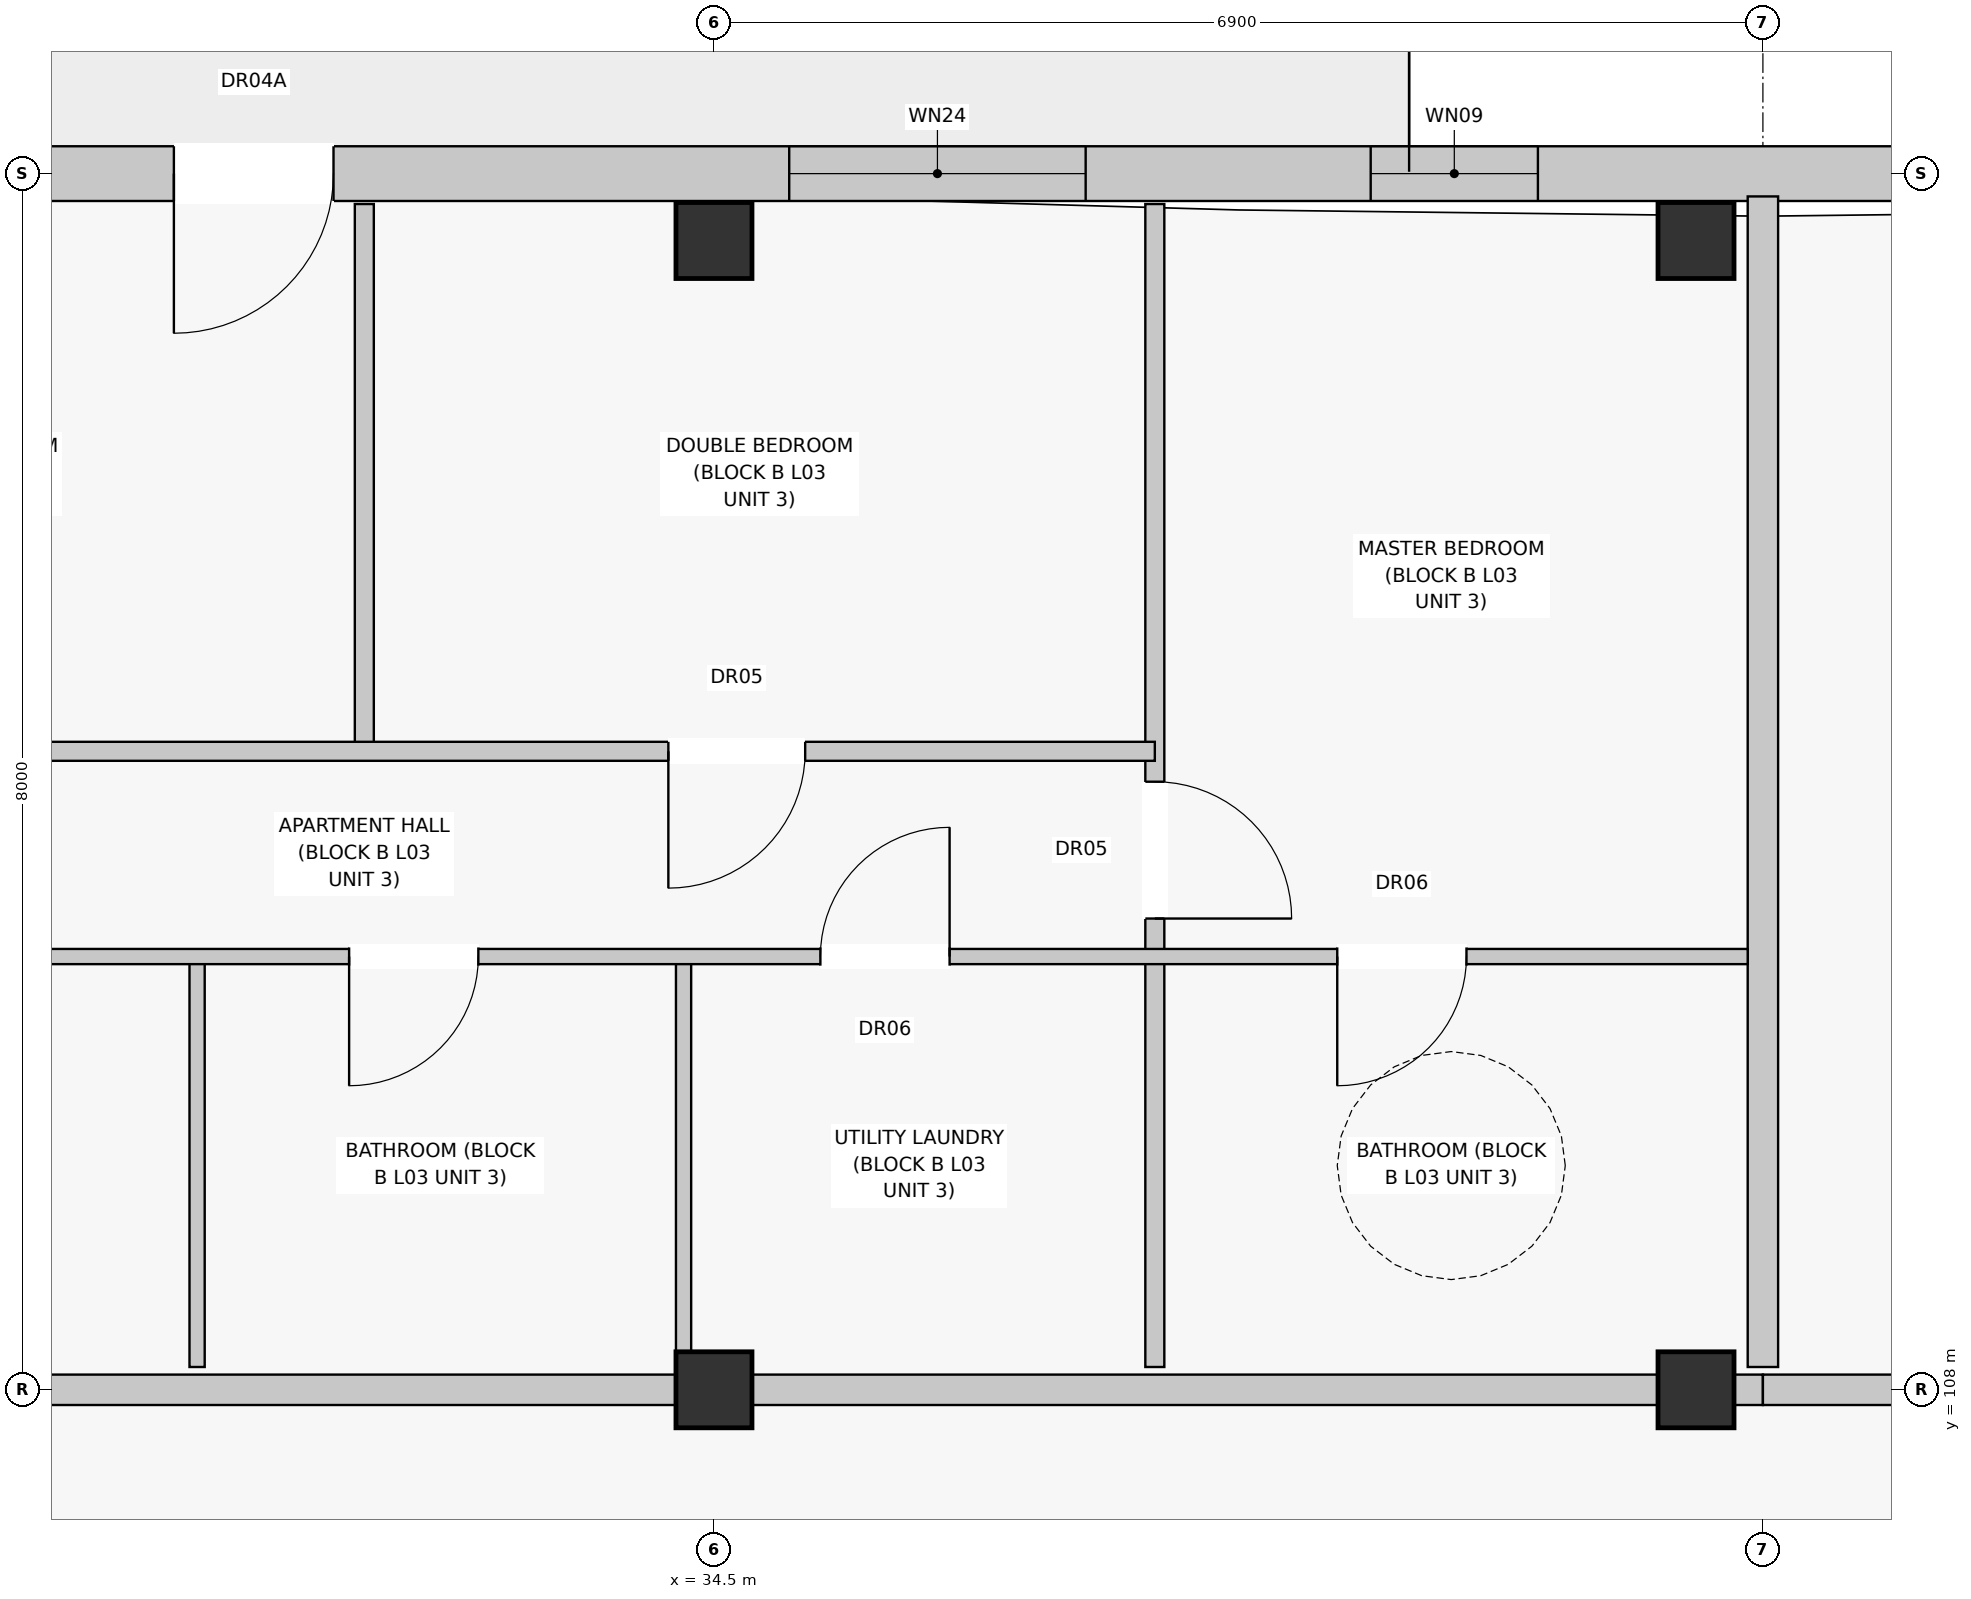
"""IFC4 building model, lengths in metres.
Left out: names, types, materials, properties, quantities, classifications, styles, units other than length and angle.
Written with IfcOpenShell. Run it as: python <this file> out.ifc"""

import sys

from ifc_helpers import new_model, si_unit, direction, frame, frame_2d, origin, origin_with_axes, origin_2d, place, context, subcontext, project, spatial, rectangle, extrude, element, fill, save


model = new_model("IFC4")
c1 = context("Model", 3, precision=1e-05, world=origin(), true_north=direction((0.0, 1.0)))
c2 = subcontext(c1, "Body", "Model", "MODEL_VIEW")
j1 = project(units=[si_unit("LENGTHUNIT", "METRE"), si_unit("PLANEANGLEUNIT", "RADIAN")], contexts=[c1])
p1 = place(None, origin())
s1 = spatial("IfcSite", under=j1, at=p1, CompositionType="ELEMENT")
p2 = place(p1, origin())
s2 = spatial("IfcBuilding", under=s1, at=p2, CompositionType="ELEMENT")
p3 = place(p2, frame((0.0, 0.0, 11.2)))
s3 = spatial("IfcBuildingStorey", under=s2, at=p3, CompositionType="ELEMENT", Elevation=11.2)
for number, where, z_axis, x_axis in (
    (1, (34.5, 108.0, 0.0), (0.0, 0.0, 1.0), (1.0, 0.0, 0.0)),
    (2, (34.5, 115.56, 0.0), (0.0, 0.0, 1.0), (1.0, 0.0, 0.0)),
    (3, (40.96, 108.0, 0.0), (0.0, 0.0, 1.0), (1.0, 0.0, 0.0)),
    (4, (40.96, 115.56, 0.0), (0.0, 0.0, 1.0), (1.0, 0.0, 0.0)),
):
    element("IfcColumn", number, at=place(p3, frame(where, z_axis=z_axis, x_axis=x_axis)), inside=s3, PredefinedType="COLUMN", context=c2, shape_type="SweptSolid", body=[
        extrude(rectangle(XDim=0.5, YDim=0.5, at=origin_2d()), origin(), (0.0, 0.0, 1.0), 3.2),
    ])
p4 = place(p3, frame((0.17, 116.0, 0.0), z_axis=(0.0, 0.0, 1.0), x_axis=(1.0, 0.0, 0.0)))
e5 = element("IfcWall", 5, at=p4, inside=s3, PredefinedType="STANDARD", context=c2, shape_type="SweptSolid", body=[
    extrude(rectangle(XDim=54.86, YDim=0.36, at=frame_2d((27.43, 0.0))), origin(), (0.0, 0.0, 1.0), 2.94),
])
p5 = place(p4, frame((2.777, 0.0, 0.0)))
e6 = element("IfcOpeningElement", 6, at=p5, cuts=e5, PredefinedType="OPENING", context=c2, shape_type="SweptSolid", body=[
    extrude(rectangle(XDim=1.05, YDim=2.12, at=frame_2d((0.525, 1.06))), frame((0.0, 0.192, 0.0), z_axis=(0.0, -1.0, 0.0), x_axis=(1.0, 0.0, 0.0)), (0.0, 0.0, 1.0), 0.384),
])
p6 = place(p4, frame((16.277, 0.0, 0.0)))
e7 = element("IfcOpeningElement", 7, at=p6, cuts=e5, PredefinedType="OPENING", context=c2, shape_type="SweptSolid", body=[
    extrude(rectangle(XDim=1.05, YDim=2.12, at=frame_2d((0.525, 1.06))), frame((0.0, 0.192, 0.0), z_axis=(0.0, -1.0, 0.0), x_axis=(1.0, 0.0, 0.0)), (0.0, 0.0, 1.0), 0.384),
])
p7 = place(p4, frame((30.777, 0.0, 0.0)))
e8 = element("IfcOpeningElement", 8, at=p7, cuts=e5, PredefinedType="OPENING", context=c2, shape_type="SweptSolid", body=[
    extrude(rectangle(XDim=1.05, YDim=2.12, at=frame_2d((0.525, 1.06))), frame((0.0, 0.192, 0.0), z_axis=(0.0, -1.0, 0.0), x_axis=(1.0, 0.0, 0.0)), (0.0, 0.0, 1.0), 0.384),
])
p8 = place(p4, frame((45.157, 0.0, 0.0)))
e9 = element("IfcOpeningElement", 9, at=p8, cuts=e5, PredefinedType="OPENING", context=c2, shape_type="SweptSolid", body=[
    extrude(rectangle(XDim=1.05, YDim=2.12, at=frame_2d((0.525, 1.06))), frame((0.0, 0.192, 0.0), z_axis=(0.0, -1.0, 0.0), x_axis=(1.0, 0.0, 0.0)), (0.0, 0.0, 1.0), 0.384),
])
p9 = place(p4, frame((1.05, 0.0, 0.72)))
e10 = element("IfcOpeningElement", 10, at=p9, cuts=e5, PredefinedType="OPENING", context=c2, shape_type="SweptSolid", body=[
    extrude(rectangle(XDim=1.1, YDim=1.5, at=frame_2d((0.55, 0.75))), frame((0.0, 0.192, 0.0), z_axis=(0.0, -1.0, 0.0), x_axis=(1.0, 0.0, 0.0)), (0.0, 0.0, 1.0), 0.384),
])
p10 = place(p4, frame((4.325, 0.0, 0.8)))
e11 = element("IfcOpeningElement", 11, at=p10, cuts=e5, PredefinedType="OPENING", context=c2, shape_type="SweptSolid", body=[
    extrude(rectangle(XDim=1.95, YDim=1.65, at=frame_2d((0.975, 0.825))), frame((0.0, 0.192, 0.0), z_axis=(0.0, -1.0, 0.0), x_axis=(1.0, 0.0, 0.0)), (0.0, 0.0, 1.0), 0.384),
])
p11 = place(p4, frame((10.45, 0.0, 0.72)))
e12 = element("IfcOpeningElement", 12, at=p11, cuts=e5, PredefinedType="OPENING", context=c2, shape_type="SweptSolid", body=[
    extrude(rectangle(XDim=1.1, YDim=1.5, at=frame_2d((0.55, 0.75))), frame((0.0, 0.192, 0.0), z_axis=(0.0, -1.0, 0.0), x_axis=(1.0, 0.0, 0.0)), (0.0, 0.0, 1.0), 0.384),
])
p12 = place(p4, frame((14.55, 0.0, 0.72)))
e13 = element("IfcOpeningElement", 13, at=p12, cuts=e5, PredefinedType="OPENING", context=c2, shape_type="SweptSolid", body=[
    extrude(rectangle(XDim=1.1, YDim=1.5, at=frame_2d((0.55, 0.75))), frame((0.0, 0.192, 0.0), z_axis=(0.0, -1.0, 0.0), x_axis=(1.0, 0.0, 0.0)), (0.0, 0.0, 1.0), 0.384),
])
p13 = place(p4, frame((18.025, 0.0, 0.8)))
e14 = element("IfcOpeningElement", 14, at=p13, cuts=e5, PredefinedType="OPENING", context=c2, shape_type="SweptSolid", body=[
    extrude(rectangle(XDim=1.95, YDim=1.65, at=frame_2d((0.975, 0.825))), frame((0.0, 0.192, 0.0), z_axis=(0.0, -1.0, 0.0), x_axis=(1.0, 0.0, 0.0)), (0.0, 0.0, 1.0), 0.384),
])
p14 = place(p4, frame((22.8, 0.0, 0.8)))
e15 = element("IfcOpeningElement", 15, at=p14, cuts=e5, PredefinedType="OPENING", context=c2, shape_type="SweptSolid", body=[
    extrude(rectangle(XDim=1.8, YDim=1.7, at=frame_2d((0.9, 0.85))), frame((0.0, 0.192, 0.0), z_axis=(0.0, -1.0, 0.0), x_axis=(1.0, 0.0, 0.0)), (0.0, 0.0, 1.0), 0.384),
])
p15 = place(p4, frame((28.85, 0.0, 0.72)))
e16 = element("IfcOpeningElement", 16, at=p15, cuts=e5, PredefinedType="OPENING", context=c2, shape_type="SweptSolid", body=[
    extrude(rectangle(XDim=1.1, YDim=1.5, at=frame_2d((0.55, 0.75))), frame((0.0, 0.192, 0.0), z_axis=(0.0, -1.0, 0.0), x_axis=(1.0, 0.0, 0.0)), (0.0, 0.0, 1.0), 0.384),
])
p16 = place(p4, frame((34.825, 0.0, 0.8)))
e17 = element("IfcOpeningElement", 17, at=p16, cuts=e5, PredefinedType="OPENING", context=c2, shape_type="SweptSolid", body=[
    extrude(rectangle(XDim=1.95, YDim=1.65, at=frame_2d((0.975, 0.825))), frame((0.0, 0.192, 0.0), z_axis=(0.0, -1.0, 0.0), x_axis=(1.0, 0.0, 0.0)), (0.0, 0.0, 1.0), 0.384),
])
p17 = place(p4, frame((38.65, 0.0, 0.72)))
e18 = element("IfcOpeningElement", 18, at=p17, cuts=e5, PredefinedType="OPENING", context=c2, shape_type="SweptSolid", body=[
    extrude(rectangle(XDim=1.1, YDim=1.5, at=frame_2d((0.55, 0.75))), frame((0.0, 0.192, 0.0), z_axis=(0.0, -1.0, 0.0), x_axis=(1.0, 0.0, 0.0)), (0.0, 0.0, 1.0), 0.384),
])
p18 = place(p4, frame((43.35, 0.0, 0.72)))
e19 = element("IfcOpeningElement", 19, at=p18, cuts=e5, PredefinedType="OPENING", context=c2, shape_type="SweptSolid", body=[
    extrude(rectangle(XDim=1.1, YDim=1.5, at=frame_2d((0.55, 0.75))), frame((0.0, 0.192, 0.0), z_axis=(0.0, -1.0, 0.0), x_axis=(1.0, 0.0, 0.0)), (0.0, 0.0, 1.0), 0.384),
])
p19 = place(p4, frame((48.583, 0.0, 0.8)))
e20 = element("IfcOpeningElement", 20, at=p19, cuts=e5, PredefinedType="OPENING", context=c2, shape_type="SweptSolid", body=[
    extrude(rectangle(XDim=1.95, YDim=1.65, at=frame_2d((0.975, 0.825))), frame((0.0, 0.192, 0.0), z_axis=(0.0, -1.0, 0.0), x_axis=(1.0, 0.0, 0.0)), (0.0, 0.0, 1.0), 0.384),
])
p20 = place(p4, frame((52.25, 0.0, 0.72)))
e21 = element("IfcOpeningElement", 21, at=p20, cuts=e5, PredefinedType="OPENING", context=c2, shape_type="SweptSolid", body=[
    extrude(rectangle(XDim=1.1, YDim=1.5, at=frame_2d((0.55, 0.75))), frame((0.0, 0.192, 0.0), z_axis=(0.0, -1.0, 0.0), x_axis=(1.0, 0.0, 0.0)), (0.0, 0.0, 1.0), 0.384),
])
p21 = place(p3, frame((41.4, 108.15, 0.0), z_axis=(0.0, 0.0, 1.0), x_axis=(0.0, 1.0, 0.0)))
e22 = element("IfcWall", 22, at=p21, inside=s3, PredefinedType="PARTITIONING", context=c2, shape_type="SweptSolid", body=[
    extrude(rectangle(XDim=7.7, YDim=0.2, at=frame_2d((3.85, 0.0))), origin(), (0.0, 0.0, 1.0), 2.94),
])
p22 = place(p3, frame((20.7, 108.0, 0.0), z_axis=(0.0, 0.0, 1.0), x_axis=(1.0, 0.0, 0.0)))
e23 = element("IfcWall", 23, at=p22, inside=s3, PredefinedType="PARTITIONING", context=c2, shape_type="SweptSolid", body=[
    extrude(rectangle(XDim=20.7, YDim=0.2, at=frame_2d((10.35, 0.0))), origin(), (0.0, 0.0, 1.0), 2.38),
])
p23 = place(p22, frame((2.4, 0.0, 0.0)))
e24 = element("IfcOpeningElement", 24, at=p23, cuts=e23, PredefinedType="OPENING", context=c2, shape_type="SweptSolid", body=[
    extrude(rectangle(XDim=0.95, YDim=2.15, at=frame_2d((0.475, 1.075))), frame((0.0, 0.112, 0.0), z_axis=(0.0, -1.0, 0.0), x_axis=(1.0, 0.0, 0.0)), (0.0, 0.0, 1.0), 0.224),
])
for number, where, z_axis, x_axis in (
    (25, (31.1, 108.15, 0.0), (0.0, 0.0, 1.0), (0.0, 1.0, 0.0)),
    (26, (34.3, 108.15, 0.0), (0.0, 0.0, 1.0), (0.0, 1.0, 0.0)),
):
    element("IfcWall", number, at=place(p3, frame(where, z_axis=z_axis, x_axis=x_axis)), inside=s3, PredefinedType="PARTITIONING", context=c2, shape_type="SweptSolid", body=[
        extrude(rectangle(XDim=2.7, YDim=0.1, at=frame_2d((1.35, 0.0))), origin(), (0.0, 0.0, 1.0), 2.94),
    ])
p24 = place(p3, frame((32.2, 112.2, 0.0), z_axis=(0.0, 0.0, 1.0), x_axis=(0.0, 1.0, 0.0)))
e27 = element("IfcWall", 27, at=p24, inside=s3, PredefinedType="PARTITIONING", context=c2, shape_type="SweptSolid", body=[
    extrude(rectangle(XDim=3.6, YDim=0.125, at=frame_2d((1.8, 0.0))), origin(), (0.0, 0.0, 1.0), 2.94),
])
p25 = place(p3, frame((37.4, 108.15, 0.0), z_axis=(0.0, 0.0, 1.0), x_axis=(0.0, 1.0, 0.0)))
e28 = element("IfcWall", 28, at=p25, inside=s3, PredefinedType="PARTITIONING", context=c2, shape_type="SweptSolid", body=[
    extrude(rectangle(XDim=7.65, YDim=0.125, at=frame_2d((3.825, 0.0))), origin(), (0.0, 0.0, 1.0), 2.94),
])
p26 = place(p25, frame((2.95, 0.0, 0.0)))
e29 = element("IfcOpeningElement", 29, at=p26, cuts=e28, PredefinedType="OPENING", context=c2, shape_type="SweptSolid", body=[
    extrude(rectangle(XDim=0.9, YDim=2.1, at=frame_2d((0.45, 1.05))), frame((0.0, 0.074, 0.0), z_axis=(0.0, -1.0, 0.0), x_axis=(1.0, 0.0, 0.0)), (0.0, 0.0, 1.0), 0.149),
])
p27 = place(p3, frame((27.0, 110.85, 0.0), z_axis=(0.0, 0.0, 1.0), x_axis=(1.0, 0.0, 0.0)))
e30 = element("IfcWall", 30, at=p27, inside=s3, PredefinedType="PARTITIONING", context=c2, shape_type="SweptSolid", body=[
    extrude(rectangle(XDim=14.3, YDim=0.1, at=frame_2d((7.15, 0.0))), origin(), (0.0, 0.0, 1.0), 2.94),
])
p28 = place(p27, frame((1.6, 0.0, 0.0)))
e31 = element("IfcOpeningElement", 31, at=p28, cuts=e30, PredefinedType="OPENING", context=c2, shape_type="SweptSolid", body=[
    extrude(rectangle(XDim=0.9, YDim=2.1, at=frame_2d((0.45, 1.05))), frame((0.0, 0.062, 0.0), z_axis=(0.0, -1.0, 0.0), x_axis=(1.0, 0.0, 0.0)), (0.0, 0.0, 1.0), 0.124),
])
p29 = place(p27, frame((5.1, 0.0, 0.0)))
e32 = element("IfcOpeningElement", 32, at=p29, cuts=e30, PredefinedType="OPENING", context=c2, shape_type="SweptSolid", body=[
    extrude(rectangle(XDim=0.85, YDim=2.05, at=frame_2d((0.425, 1.025))), frame((0.0, 0.062, 0.0), z_axis=(0.0, -1.0, 0.0), x_axis=(1.0, 0.0, 0.0)), (0.0, 0.0, 1.0), 0.124),
])
p30 = place(p27, frame((8.2, 0.0, 0.0)))
e33 = element("IfcOpeningElement", 33, at=p30, cuts=e30, PredefinedType="OPENING", context=c2, shape_type="SweptSolid", body=[
    extrude(rectangle(XDim=0.85, YDim=2.05, at=frame_2d((0.425, 1.025))), frame((0.0, 0.062, 0.0), z_axis=(0.0, -1.0, 0.0), x_axis=(1.0, 0.0, 0.0)), (0.0, 0.0, 1.0), 0.124),
])
p31 = place(p27, frame((11.6, 0.0, 0.0)))
e34 = element("IfcOpeningElement", 34, at=p31, cuts=e30, PredefinedType="OPENING", context=c2, shape_type="SweptSolid", body=[
    extrude(rectangle(XDim=0.85, YDim=2.05, at=frame_2d((0.425, 1.025))), frame((0.0, 0.062, 0.0), z_axis=(0.0, -1.0, 0.0), x_axis=(1.0, 0.0, 0.0)), (0.0, 0.0, 1.0), 0.124),
])
p32 = place(p3, frame((27.0, 112.2, 0.0), z_axis=(0.0, 0.0, 1.0), x_axis=(1.0, 0.0, 0.0)))
e35 = element("IfcWall", 35, at=p32, inside=s3, PredefinedType="PARTITIONING", context=c2, shape_type="SweptSolid", body=[
    extrude(rectangle(XDim=10.4, YDim=0.125, at=frame_2d((5.2, 0.0))), origin(), (0.0, 0.0, 1.0), 2.94),
])
p33 = place(p32, frame((2.0, 0.0, 0.0)))
e36 = element("IfcOpeningElement", 36, at=p33, cuts=e35, PredefinedType="OPENING", context=c2, shape_type="SweptSolid", body=[
    extrude(rectangle(XDim=0.9, YDim=2.1, at=frame_2d((0.45, 1.05))), frame((0.0, 0.074, 0.0), z_axis=(0.0, -1.0, 0.0), x_axis=(1.0, 0.0, 0.0)), (0.0, 0.0, 1.0), 0.149),
])
p34 = place(p32, frame((7.2, 0.0, 0.0)))
e37 = element("IfcOpeningElement", 37, at=p34, cuts=e35, PredefinedType="OPENING", context=c2, shape_type="SweptSolid", body=[
    extrude(rectangle(XDim=0.9, YDim=2.1, at=frame_2d((0.45, 1.05))), frame((0.0, 0.074, 0.0), z_axis=(0.0, -1.0, 0.0), x_axis=(1.0, 0.0, 0.0)), (0.0, 0.0, 1.0), 0.149),
])
p35 = place(p3, frame((41.4, 108.0, 0.0), z_axis=(0.0, 0.0, 1.0), x_axis=(1.0, 0.0, 0.0)))
e38 = element("IfcWall", 38, at=p35, inside=s3, PredefinedType="PARTITIONING", context=c2, shape_type="SweptSolid", body=[
    extrude(rectangle(XDim=13.8, YDim=0.2, at=frame_2d((6.9, 0.0))), origin(), (0.0, 0.0, 1.0), 2.38),
])
p36 = place(p35, frame((2.4, 0.0, 0.0)))
e39 = element("IfcOpeningElement", 39, at=p36, cuts=e38, PredefinedType="OPENING", context=c2, shape_type="SweptSolid", body=[
    extrude(rectangle(XDim=0.95, YDim=2.15, at=frame_2d((0.475, 1.075))), frame((0.0, 0.112, 0.0), z_axis=(0.0, -1.0, 0.0), x_axis=(1.0, 0.0, 0.0)), (0.0, 0.0, 1.0), 0.224),
])
p37 = place(p7, frame((1.05, 0.0, 0.0), z_axis=(0.0, 0.0, 1.0), x_axis=(-1.0, 0.0, 0.0)))
e40 = element("IfcDoor", 40, at=p37, inside=s3, OperationType="SINGLE_SWING_LEFT", PredefinedType="DOOR", context=c2, shape_type="SweptSolid", body=[
    extrude(rectangle(XDim=1.05, YDim=2.12, at=frame_2d((0.525, 1.06))), frame((0.0, 0.025, 0.0), z_axis=(0.0, -1.0, 0.0), x_axis=(1.0, 0.0, 0.0)), (0.0, 0.0, 1.0), 0.05),
])
fill(e8, e40)
p38 = place(p16, origin_with_axes())
e41 = element("IfcWindow", 41, at=p38, inside=s3, PartitioningType="SINGLE_PANEL", PredefinedType="WINDOW", context=c2, shape_type="SweptSolid", body=[
    extrude(rectangle(XDim=1.95, YDim=1.65, at=frame_2d((0.975, 0.825))), frame((0.0, 0.03, 0.0), z_axis=(0.0, -1.0, 0.0), x_axis=(1.0, 0.0, 0.0)), (0.0, 0.0, 1.0), 0.06),
])
fill(e17, e41)
p39 = place(p17, origin_with_axes())
e42 = element("IfcWindow", 42, at=p39, inside=s3, PartitioningType="SINGLE_PANEL", PredefinedType="WINDOW", context=c2, shape_type="SweptSolid", body=[
    extrude(rectangle(XDim=1.1, YDim=1.5, at=frame_2d((0.55, 0.75))), frame((0.0, 0.03, 0.0), z_axis=(0.0, -1.0, 0.0), x_axis=(1.0, 0.0, 0.0)), (0.0, 0.0, 1.0), 0.06),
])
fill(e18, e42)
p40 = place(p26, frame((0.9, 0.0, 0.0), z_axis=(0.0, 0.0, 1.0), x_axis=(-1.0, 0.0, 0.0)))
e43 = element("IfcDoor", 43, at=p40, inside=s3, OperationType="SINGLE_SWING_LEFT", PredefinedType="DOOR", context=c2, shape_type="SweptSolid", body=[
    extrude(rectangle(XDim=0.9, YDim=2.1, at=frame_2d((0.45, 1.05))), frame((0.0, 0.025, 0.0), z_axis=(0.0, -1.0, 0.0), x_axis=(1.0, 0.0, 0.0)), (0.0, 0.0, 1.0), 0.05),
])
fill(e29, e43)
p41 = place(p29, frame((0.85, 0.0, 0.0), z_axis=(0.0, 0.0, 1.0), x_axis=(-1.0, 0.0, 0.0)))
e44 = element("IfcDoor", 44, at=p41, inside=s3, OperationType="SINGLE_SWING_LEFT", PredefinedType="DOOR", context=c2, shape_type="SweptSolid", body=[
    extrude(rectangle(XDim=0.85, YDim=2.05, at=frame_2d((0.425, 1.025))), frame((0.0, 0.025, 0.0), z_axis=(0.0, -1.0, 0.0), x_axis=(1.0, 0.0, 0.0)), (0.0, 0.0, 1.0), 0.05),
])
fill(e32, e44)
p42 = place(p30, origin_with_axes())
e45 = element("IfcDoor", 45, at=p42, inside=s3, OperationType="SINGLE_SWING_RIGHT", PredefinedType="DOOR", context=c2, shape_type="SweptSolid", body=[
    extrude(rectangle(XDim=0.85, YDim=2.05, at=frame_2d((0.425, 1.025))), frame((0.0, 0.025, 0.0), z_axis=(0.0, -1.0, 0.0), x_axis=(1.0, 0.0, 0.0)), (0.0, 0.0, 1.0), 0.05),
])
fill(e33, e45)
p43 = place(p31, frame((0.85, 0.0, 0.0), z_axis=(0.0, 0.0, 1.0), x_axis=(-1.0, 0.0, 0.0)))
e46 = element("IfcDoor", 46, at=p43, inside=s3, OperationType="SINGLE_SWING_LEFT", PredefinedType="DOOR", context=c2, shape_type="SweptSolid", body=[
    extrude(rectangle(XDim=0.85, YDim=2.05, at=frame_2d((0.425, 1.025))), frame((0.0, 0.025, 0.0), z_axis=(0.0, -1.0, 0.0), x_axis=(1.0, 0.0, 0.0)), (0.0, 0.0, 1.0), 0.05),
])
fill(e34, e46)
p44 = place(p34, frame((0.9, 0.0, 0.0), z_axis=(0.0, 0.0, 1.0), x_axis=(-1.0, 0.0, 0.0)))
e47 = element("IfcDoor", 47, at=p44, inside=s3, OperationType="SINGLE_SWING_LEFT", PredefinedType="DOOR", context=c2, shape_type="SweptSolid", body=[
    extrude(rectangle(XDim=0.9, YDim=2.1, at=frame_2d((0.45, 1.05))), frame((0.0, 0.025, 0.0), z_axis=(0.0, -1.0, 0.0), x_axis=(1.0, 0.0, 0.0)), (0.0, 0.0, 1.0), 0.05),
])
fill(e37, e47)
save(model, sys.argv[1])
